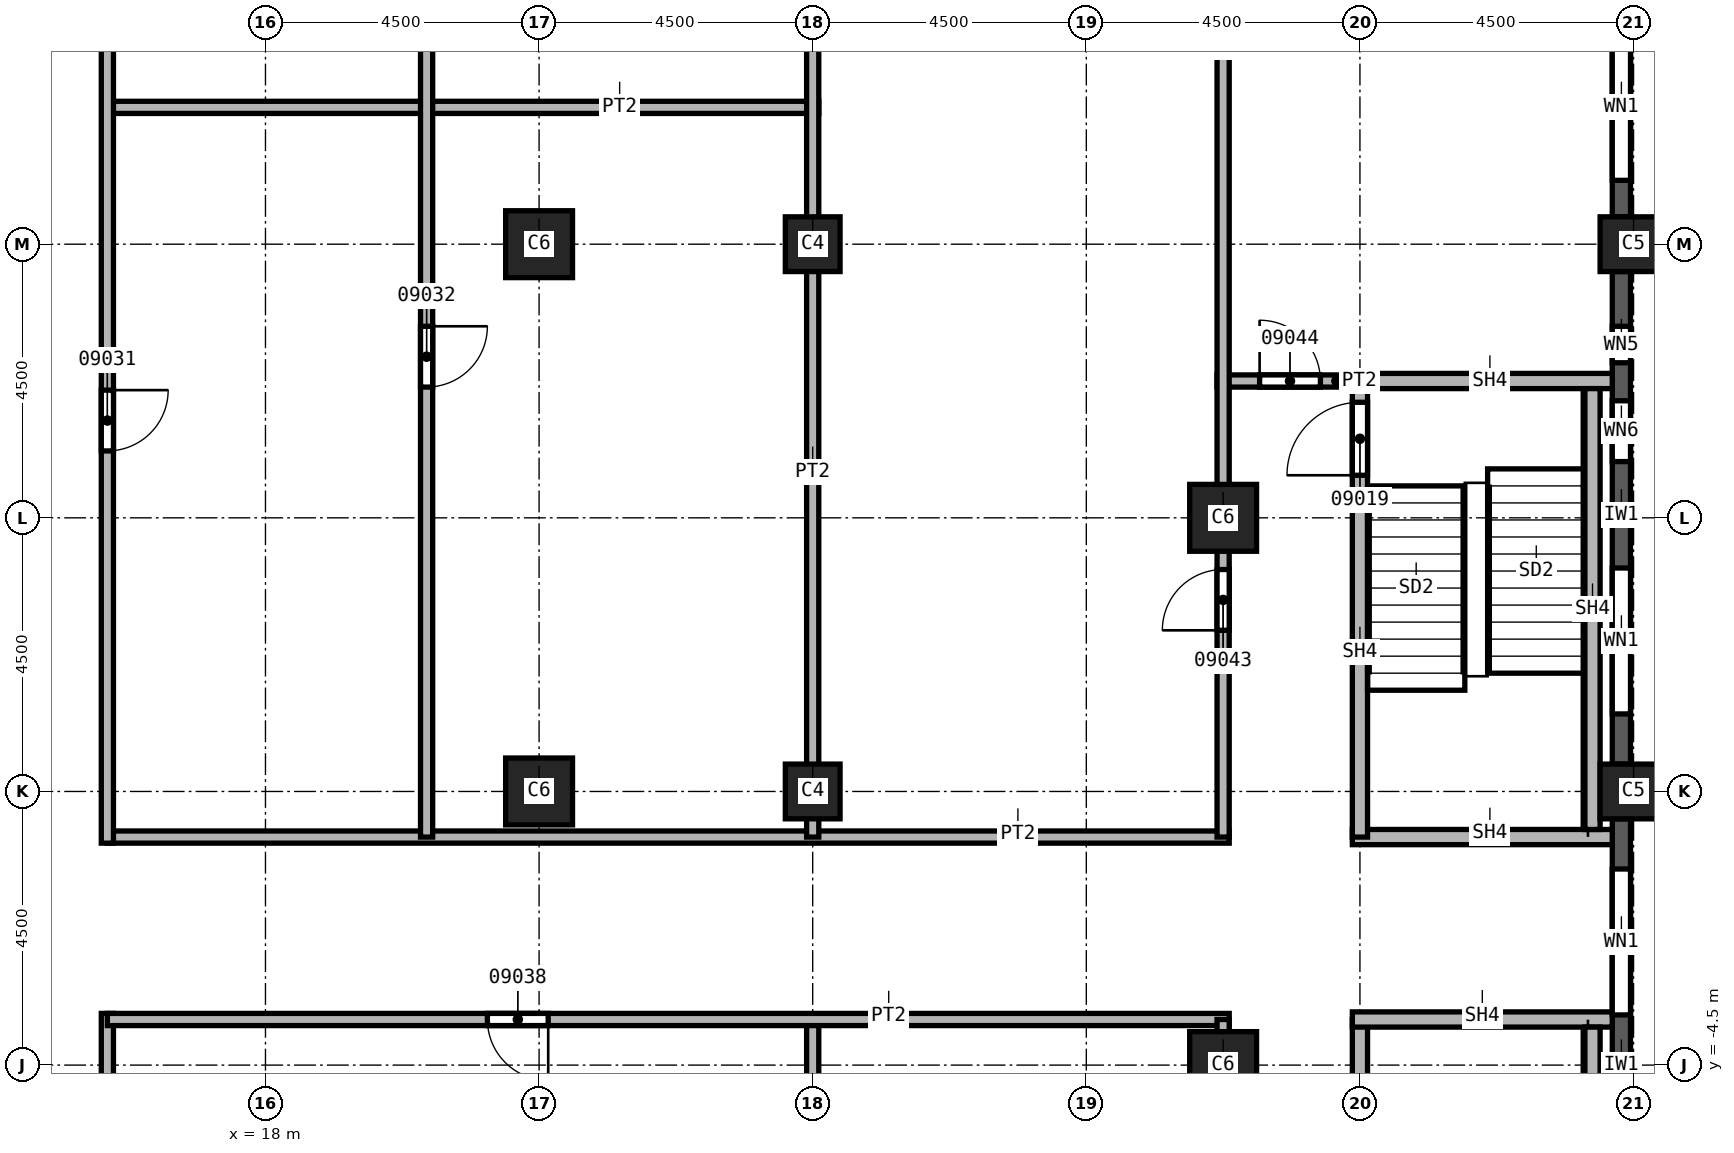
"""IFC4 building model, lengths in metres.
Left out: names, types, materials, properties, quantities, classifications, styles, units other than length and angle.
Written with IfcOpenShell. Run it as: python <this file> out.ifc"""

import sys

from ifc_helpers import new_model, si_unit, direction, frame, frame_2d, origin, origin_2d, place, context, subcontext, project, spatial, rectangle, extrude, element, fill, save


model = new_model("IFC4")
c1 = context("Model", 3, precision=1e-05, world=origin(), true_north=direction((0.0, 1.0)))
c2 = subcontext(c1, "Body", "Model", "MODEL_VIEW")
j1 = project(units=[si_unit("LENGTHUNIT", "METRE"), si_unit("PLANEANGLEUNIT", "RADIAN")], contexts=[c1])
p1 = place(None, origin())
s1 = spatial("IfcSite", under=j1, at=p1, CompositionType="ELEMENT")
p2 = place(p1, origin())
s2 = spatial("IfcBuilding", under=s1, at=p2, CompositionType="ELEMENT")
p3 = place(p2, frame((0.0, 0.0, 166.0)))
s3 = spatial("IfcBuildingStorey", under=s2, at=p3, CompositionType="ELEMENT", Elevation=166.0)
for number, where, z_axis, x_axis in (
    (1, (40.5, 0.0, 0.0), (0.0, 0.0, 1.0), (0.0, 1.0, 0.0)),
    (2, (40.5, 9.0, 0.0), (0.0, 0.0, 1.0), (0.0, 1.0, 0.0)),
):
    element("IfcColumn", number, at=place(p3, frame(where, z_axis=z_axis, x_axis=x_axis)), inside=s3, PredefinedType="COLUMN", context=c2, shape_type="SweptSolid", body=[
        extrude(rectangle(XDim=0.9, YDim=1.1, at=origin_2d()), origin(), (0.0, 0.0, 1.0), 3.7),
    ])
for number, where, z_axis, x_axis in (
    (3, (33.75, 4.5, 0.0), (0.0, 0.0, 1.0), (1.0, 0.0, 0.0)),
    (4, (33.75, -4.5, 0.0), (0.0, 0.0, 1.0), (1.0, 0.0, 0.0)),
    (5, (22.5, 0.0, 0.0), (0.0, 0.0, 1.0), (1.0, 0.0, 0.0)),
    (6, (22.5, 9.0, 0.0), (0.0, 0.0, 1.0), (1.0, 0.0, 0.0)),
):
    element("IfcColumn", number, at=place(p3, frame(where, z_axis=z_axis, x_axis=x_axis)), inside=s3, PredefinedType="COLUMN", context=c2, shape_type="SweptSolid", body=[
        extrude(rectangle(XDim=1.1, YDim=1.1, at=origin_2d()), origin(), (0.0, 0.0, 1.0), 3.7),
    ])
for number, where, z_axis, x_axis in (
    (7, (27.0, 0.0, 0.0), (0.0, 0.0, 1.0), (1.0, 0.0, 0.0)),
    (8, (27.0, 9.0, 0.0), (0.0, 0.0, 1.0), (1.0, 0.0, 0.0)),
):
    element("IfcColumn", number, at=place(p3, frame(where, z_axis=z_axis, x_axis=x_axis)), inside=s3, PredefinedType="COLUMN", context=c2, shape_type="SweptSolid", body=[
        extrude(rectangle(XDim=0.9, YDim=0.9, at=origin_2d()), origin(), (0.0, 0.0, 1.0), 3.7),
    ])
p4 = place(p3, frame((40.3, -8.55, 0.0), z_axis=(0.0, 0.0, 1.0), x_axis=(0.0, 1.0, 0.0)))
e9 = element("IfcWall", 9, at=p4, inside=s3, PredefinedType="SOLIDWALL", context=c2, shape_type="SweptSolid", body=[
    extrude(rectangle(XDim=8.1, YDim=0.3, at=frame_2d((4.05, 0.0))), origin(), (0.0, 0.0, 1.0), 3.1),
])
p5 = place(p4, frame((0.825, 0.0, 0.8)))
e10 = element("IfcOpeningElement", 10, at=p5, cuts=e9, PredefinedType="OPENING", context=c2, shape_type="SweptSolid", body=[
    extrude(rectangle(XDim=2.4, YDim=1.95, at=frame_2d((1.2, 0.975))), frame((0.0, 0.15, 0.0), z_axis=(0.0, -1.0, 0.0), x_axis=(1.0, 0.0, 0.0)), (0.0, 0.0, 1.0), 0.3),
])
p6 = place(p4, frame((4.875, 0.0, 0.8)))
e11 = element("IfcOpeningElement", 11, at=p6, cuts=e9, PredefinedType="OPENING", context=c2, shape_type="SweptSolid", body=[
    extrude(rectangle(XDim=2.4, YDim=1.95, at=frame_2d((1.2, 0.975))), frame((0.0, 0.15, 0.0), z_axis=(0.0, -1.0, 0.0), x_axis=(1.0, 0.0, 0.0)), (0.0, 0.0, 1.0), 0.3),
])
p7 = place(p3, frame((40.3, 0.45, 0.0), z_axis=(0.0, 0.0, 1.0), x_axis=(0.0, 1.0, 0.0)))
e12 = element("IfcWall", 12, at=p7, inside=s3, PredefinedType="SOLIDWALL", context=c2, shape_type="SweptSolid", body=[
    extrude(rectangle(XDim=8.1, YDim=0.3, at=frame_2d((4.05, 0.0))), origin(), (0.0, 0.0, 1.0), 3.1),
])
p8 = place(p7, frame((0.825, 0.0, 0.8)))
e13 = element("IfcOpeningElement", 13, at=p8, cuts=e12, PredefinedType="OPENING", context=c2, shape_type="SweptSolid", body=[
    extrude(rectangle(XDim=2.4, YDim=1.95, at=frame_2d((1.2, 0.975))), frame((0.0, 0.15, 0.0), z_axis=(0.0, -1.0, 0.0), x_axis=(1.0, 0.0, 0.0)), (0.0, 0.0, 1.0), 0.3),
])
p9 = place(p7, frame((4.975, 0.0, 0.8)))
e14 = element("IfcOpeningElement", 14, at=p9, cuts=e12, PredefinedType="OPENING", context=c2, shape_type="SweptSolid", body=[
    extrude(rectangle(XDim=1.0, YDim=1.95, at=frame_2d((0.5, 0.975))), frame((0.0, 0.15, 0.0), z_axis=(0.0, -1.0, 0.0), x_axis=(1.0, 0.0, 0.0)), (0.0, 0.0, 1.0), 0.3),
])
p10 = place(p7, frame((6.6, 0.0, 0.8)))
e15 = element("IfcOpeningElement", 15, at=p10, cuts=e12, PredefinedType="OPENING", context=c2, shape_type="SweptSolid", body=[
    extrude(rectangle(XDim=0.6, YDim=1.95, at=frame_2d((0.3, 0.975))), frame((0.0, 0.15, 0.0), z_axis=(0.0, -1.0, 0.0), x_axis=(1.0, 0.0, 0.0)), (0.0, 0.0, 1.0), 0.3),
])
p11 = place(p3, frame((40.3, 9.45, 0.0), z_axis=(0.0, 0.0, 1.0), x_axis=(0.0, 1.0, 0.0)))
e16 = element("IfcWall", 16, at=p11, inside=s3, PredefinedType="SOLIDWALL", context=c2, shape_type="SweptSolid", body=[
    extrude(rectangle(XDim=3.6, YDim=0.3, at=frame_2d((1.8, 0.0))), origin(), (0.0, 0.0, 1.0), 3.1),
])
p12 = place(p11, frame((0.6, 0.0, 0.8)))
e17 = element("IfcOpeningElement", 17, at=p12, cuts=e16, PredefinedType="OPENING", context=c2, shape_type="SweptSolid", body=[
    extrude(rectangle(XDim=2.4, YDim=1.95, at=frame_2d((1.2, 0.975))), frame((0.0, 0.15, 0.0), z_axis=(0.0, -1.0, 0.0), x_axis=(1.0, 0.0, 0.0)), (0.0, 0.0, 1.0), 0.3),
])
p13 = place(p3, frame((15.4, -3.65, 0.0), z_axis=(0.0, 0.0, 1.0), x_axis=(0.0, -1.0, 0.0)))
e18 = element("IfcWall", 18, at=p13, inside=s3, PredefinedType="PARTITIONING", context=c2, shape_type="SweptSolid", body=[
    extrude(rectangle(XDim=19.6, YDim=0.2, at=frame_2d((9.8, 0.0))), origin(), (0.0, 0.0, 1.0), 3.7),
])
p14 = place(p13, frame((18.275, 0.0, 0.0)))
e19 = element("IfcOpeningElement", 19, at=p14, cuts=e18, PredefinedType="OPENING", context=c2, shape_type="SweptSolid", body=[
    extrude(rectangle(XDim=1.0, YDim=2.1, at=frame_2d((0.5, 1.05))), frame((0.0, 0.1, 0.0), z_axis=(0.0, -1.0, 0.0), x_axis=(1.0, 0.0, 0.0)), (0.0, 0.0, 1.0), 0.2),
])
p15 = place(p13, frame((14.5, 0.0, 0.0)))
e20 = element("IfcOpeningElement", 20, at=p15, cuts=e18, PredefinedType="OPENING", context=c2, shape_type="SweptSolid", body=[
    extrude(rectangle(XDim=1.0, YDim=2.1, at=frame_2d((0.5, 1.05))), frame((0.0, 0.1, 0.0), z_axis=(0.0, -1.0, 0.0), x_axis=(1.0, 0.0, 0.0)), (0.0, 0.0, 1.0), 0.2),
])
p16 = place(p13, frame((8.2, 0.0, 0.0)))
e21 = element("IfcOpeningElement", 21, at=p16, cuts=e18, PredefinedType="OPENING", context=c2, shape_type="SweptSolid", body=[
    extrude(rectangle(XDim=1.0, YDim=2.1, at=frame_2d((0.5, 1.05))), frame((0.0, 0.1, 0.0), z_axis=(0.0, -1.0, 0.0), x_axis=(1.0, 0.0, 0.0)), (0.0, 0.0, 1.0), 0.2),
])
p17 = place(p3, frame((15.4, -0.75, 0.0), z_axis=(0.0, 0.0, 1.0), x_axis=(1.0, 0.0, 0.0)))
e22 = element("IfcWall", 22, at=p17, inside=s3, PredefinedType="PARTITIONING", context=c2, shape_type="SweptSolid", body=[
    extrude(rectangle(XDim=18.45, YDim=0.2, at=frame_2d((9.225, 0.0))), origin(), (0.0, 0.0, 1.0), 3.7),
])
p18 = place(p3, frame((15.4, 11.25, 0.0), z_axis=(0.0, 0.0, 1.0), x_axis=(1.0, 0.0, 0.0)))
e23 = element("IfcWall", 23, at=p18, inside=s3, PredefinedType="PARTITIONING", context=c2, shape_type="SweptSolid", body=[
    extrude(rectangle(XDim=11.7, YDim=0.2, at=frame_2d((5.85, 0.0))), origin(), (0.0, 0.0, 1.0), 3.7),
])
p19 = place(p3, frame((15.4, 23.25, 0.0), z_axis=(0.0, 0.0, 1.0), x_axis=(0.0, -1.0, 0.0)))
e24 = element("IfcWall", 24, at=p19, inside=s3, PredefinedType="PARTITIONING", context=c2, shape_type="SweptSolid", body=[
    extrude(rectangle(XDim=24.1, YDim=0.2, at=frame_2d((12.05, 0.0))), origin(), (0.0, 0.0, 1.0), 3.7),
])
p20 = place(p19, frame((16.65, 0.0, 0.0)))
e25 = element("IfcOpeningElement", 25, at=p20, cuts=e24, PredefinedType="OPENING", context=c2, shape_type="SweptSolid", body=[
    extrude(rectangle(XDim=1.0, YDim=2.1, at=frame_2d((0.5, 1.05))), frame((0.0, 0.1, 0.0), z_axis=(0.0, -1.0, 0.0), x_axis=(1.0, 0.0, 0.0)), (0.0, 0.0, 1.0), 0.2),
])
p21 = place(p19, frame((2.8, 0.0, 0.0)))
e26 = element("IfcOpeningElement", 26, at=p21, cuts=e24, PredefinedType="OPENING", context=c2, shape_type="SweptSolid", body=[
    extrude(rectangle(XDim=1.0, YDim=2.1, at=frame_2d((0.5, 1.05))), frame((0.0, 0.1, 0.0), z_axis=(0.0, -1.0, 0.0), x_axis=(1.0, 0.0, 0.0)), (0.0, 0.0, 1.0), 0.2),
])
p22 = place(p3, frame((20.65, 23.25, 0.0), z_axis=(0.0, 0.0, 1.0), x_axis=(0.0, -1.0, 0.0)))
e27 = element("IfcWall", 27, at=p22, inside=s3, PredefinedType="PARTITIONING", context=c2, shape_type="SweptSolid", body=[
    extrude(rectangle(XDim=24.0, YDim=0.2, at=frame_2d((12.0, 0.0))), origin(), (0.0, 0.0, 1.0), 3.7),
])
p23 = place(p22, frame((15.6, 0.0, 0.0)))
e28 = element("IfcOpeningElement", 28, at=p23, cuts=e27, PredefinedType="OPENING", context=c2, shape_type="SweptSolid", body=[
    extrude(rectangle(XDim=1.0, YDim=2.1, at=frame_2d((0.5, 1.05))), frame((0.0, 0.1, 0.0), z_axis=(0.0, -1.0, 0.0), x_axis=(1.0, 0.0, 0.0)), (0.0, 0.0, 1.0), 0.2),
])
p24 = place(p22, frame((8.2, 0.0, 0.0)))
e29 = element("IfcOpeningElement", 29, at=p24, cuts=e27, PredefinedType="OPENING", context=c2, shape_type="SweptSolid", body=[
    extrude(rectangle(XDim=1.0, YDim=2.1, at=frame_2d((0.5, 1.05))), frame((0.0, 0.1, 0.0), z_axis=(0.0, -1.0, 0.0), x_axis=(1.0, 0.0, 0.0)), (0.0, 0.0, 1.0), 0.2),
])
p25 = place(p3, frame((27.0, -3.75, 0.0), z_axis=(0.0, 0.0, 1.0), x_axis=(0.0, -1.0, 0.0)))
e30 = element("IfcWall", 30, at=p25, inside=s3, PredefinedType="PARTITIONING", context=c2, shape_type="SweptSolid", body=[
    extrude(rectangle(XDim=13.7, YDim=0.2, at=frame_2d((6.85, 0.0))), origin(), (0.0, 0.0, 1.0), 3.7),
])
p26 = place(p3, frame((27.0, 17.45, 0.0), z_axis=(0.0, 0.0, 1.0), x_axis=(0.0, -1.0, 0.0)))
e31 = element("IfcWall", 31, at=p26, inside=s3, PredefinedType="PARTITIONING", context=c2, shape_type="SweptSolid", body=[
    extrude(rectangle(XDim=18.2, YDim=0.2, at=frame_2d((9.1, 0.0))), origin(), (0.0, 0.0, 1.0), 3.7),
])
p27 = place(p3, frame((33.85, -3.75, 0.0), z_axis=(0.0, 0.0, 1.0), x_axis=(-1.0, 0.0, 0.0)))
e32 = element("IfcWall", 32, at=p27, inside=s3, PredefinedType="PARTITIONING", context=c2, shape_type="SweptSolid", body=[
    extrude(rectangle(XDim=18.45, YDim=0.2, at=frame_2d((9.225, 0.0))), origin(), (0.0, 0.0, 1.0), 3.7),
])
p28 = place(p27, frame((11.2, 0.0, 0.0)))
e33 = element("IfcOpeningElement", 33, at=p28, cuts=e32, PredefinedType="OPENING", context=c2, shape_type="SweptSolid", body=[
    extrude(rectangle(XDim=1.0, YDim=2.1, at=frame_2d((0.5, 1.05))), frame((0.0, 0.1, 0.0), z_axis=(0.0, -1.0, 0.0), x_axis=(1.0, 0.0, 0.0)), (0.0, 0.0, 1.0), 0.2),
])
p29 = place(p3, frame((33.65, 6.75, 0.0), z_axis=(0.0, 0.0, 1.0), x_axis=(1.0, 0.0, 0.0)))
e34 = element("IfcWall", 34, at=p29, inside=s3, PredefinedType="PARTITIONING", context=c2, shape_type="SweptSolid", body=[
    extrude(rectangle(XDim=2.35, YDim=0.2, at=frame_2d((1.175, 0.0))), origin(), (0.0, 0.0, 1.0), 3.7),
])
p30 = place(p29, frame((0.7, 0.0, 0.0)))
e35 = element("IfcOpeningElement", 35, at=p30, cuts=e34, PredefinedType="OPENING", context=c2, shape_type="SweptSolid", body=[
    extrude(rectangle(XDim=1.0, YDim=2.1, at=frame_2d((0.5, 1.05))), frame((0.0, 0.1, 0.0), z_axis=(0.0, -1.0, 0.0), x_axis=(1.0, 0.0, 0.0)), (0.0, 0.0, 1.0), 0.2),
])
p31 = place(p3, frame((33.75, -11.25, 0.0), z_axis=(0.0, 0.0, 1.0), x_axis=(0.0, 1.0, 0.0)))
e36 = element("IfcWall", 36, at=p31, inside=s3, PredefinedType="PARTITIONING", context=c2, shape_type="SweptSolid", body=[
    extrude(rectangle(XDim=7.5, YDim=0.2, at=frame_2d((3.75, 0.0))), origin(), (0.0, 0.0, 1.0), 3.7),
])
p32 = place(p31, frame((2.35, 0.0, 0.0)))
e37 = element("IfcOpeningElement", 37, at=p32, cuts=e36, PredefinedType="OPENING", context=c2, shape_type="SweptSolid", body=[
    extrude(rectangle(XDim=1.0, YDim=2.1, at=frame_2d((0.5, 1.05))), frame((0.0, 0.1, 0.0), z_axis=(0.0, -1.0, 0.0), x_axis=(1.0, 0.0, 0.0)), (0.0, 0.0, 1.0), 0.2),
])
p33 = place(p3, frame((33.75, -0.75, 0.0), z_axis=(0.0, 0.0, 1.0), x_axis=(0.0, 1.0, 0.0)))
e38 = element("IfcWall", 38, at=p33, inside=s3, PredefinedType="PARTITIONING", context=c2, shape_type="SweptSolid", body=[
    extrude(rectangle(XDim=18.4, YDim=0.2, at=frame_2d((9.2, 0.0))), origin(), (0.0, 0.0, 1.0), 3.7),
])
p34 = place(p33, frame((3.4, 0.0, 0.0)))
e39 = element("IfcOpeningElement", 39, at=p34, cuts=e38, PredefinedType="OPENING", context=c2, shape_type="SweptSolid", body=[
    extrude(rectangle(XDim=1.0, YDim=2.1, at=frame_2d((0.5, 1.05))), frame((0.0, 0.1, 0.0), z_axis=(0.0, -1.0, 0.0), x_axis=(1.0, 0.0, 0.0)), (0.0, 0.0, 1.0), 0.2),
])
p35 = place(p3, frame((35.875, -0.75, 0.0), z_axis=(0.0, 0.0, 1.0), x_axis=(1.0, 0.0, 0.0)))
e40 = element("IfcWall", 40, at=p35, inside=s3, PredefinedType="SOLIDWALL", context=c2, shape_type="SweptSolid", body=[
    extrude(rectangle(XDim=4.275, YDim=0.25, at=frame_2d((2.137, 0.0))), origin(), (0.0, 0.0, 1.0), 3.7),
])
p36 = place(p3, frame((36.0, -11.375, 0.0), z_axis=(0.0, 0.0, 1.0), x_axis=(0.0, 1.0, 0.0)))
e41 = element("IfcWall", 41, at=p36, inside=s3, PredefinedType="SOLIDWALL", context=c2, shape_type="SweptSolid", body=[
    extrude(rectangle(XDim=7.625, YDim=0.25, at=frame_2d((3.812, 0.0))), origin(), (0.0, 0.0, 1.0), 3.7),
])
p37 = place(p36, frame((0.4, 0.0, 0.0)))
e42 = element("IfcOpeningElement", 42, at=p37, cuts=e41, PredefinedType="OPENING", context=c2, shape_type="SweptSolid", body=[
    extrude(rectangle(XDim=1.2, YDim=2.1, at=frame_2d((0.6, 1.05))), frame((0.0, 0.125, 0.0), z_axis=(0.0, -1.0, 0.0), x_axis=(1.0, 0.0, 0.0)), (0.0, 0.0, 1.0), 0.25),
])
p38 = place(p3, frame((36.0, -0.75, 0.0), z_axis=(0.0, 0.0, 1.0), x_axis=(0.0, 1.0, 0.0)))
e43 = element("IfcWall", 43, at=p38, inside=s3, PredefinedType="SOLIDWALL", context=c2, shape_type="SweptSolid", body=[
    extrude(rectangle(XDim=7.625, YDim=0.25, at=frame_2d((3.812, 0.0))), origin(), (0.0, 0.0, 1.0), 3.7),
])
p39 = place(p38, frame((5.95, 0.0, 0.0)))
e44 = element("IfcOpeningElement", 44, at=p39, cuts=e43, PredefinedType="OPENING", context=c2, shape_type="SweptSolid", body=[
    extrude(rectangle(XDim=1.2, YDim=2.1, at=frame_2d((0.6, 1.05))), frame((0.0, 0.125, 0.0), z_axis=(0.0, -1.0, 0.0), x_axis=(1.0, 0.0, 0.0)), (0.0, 0.0, 1.0), 0.25),
])
p40 = place(p3, frame((36.0, 6.75, 0.0), z_axis=(0.0, 0.0, 1.0), x_axis=(1.0, 0.0, 0.0)))
e45 = element("IfcWall", 45, at=p40, inside=s3, PredefinedType="SOLIDWALL", context=c2, shape_type="SweptSolid", body=[
    extrude(rectangle(XDim=4.15, YDim=0.25, at=frame_2d((2.075, 0.0))), origin(), (0.0, 0.0, 1.0), 3.7),
])
p41 = place(p3, frame((40.15, -3.75, 0.0), z_axis=(0.0, 0.0, 1.0), x_axis=(-1.0, 0.0, 0.0)))
e46 = element("IfcWall", 46, at=p41, inside=s3, PredefinedType="SOLIDWALL", context=c2, shape_type="SweptSolid", body=[
    extrude(rectangle(XDim=4.275, YDim=0.25, at=frame_2d((2.137, 0.0))), origin(), (0.0, 0.0, 1.0), 3.7),
])
for number, where, z_axis, x_axis in (
    (47, (39.825, -11.125, 0.0), (0.0, 0.0, 1.0), (0.0, 1.0, 0.0)),
    (48, (39.825, -0.625, 0.0), (0.0, 0.0, 1.0), (0.0, 1.0, 0.0)),
):
    element("IfcWall", number, at=place(p3, frame(where, z_axis=z_axis, x_axis=x_axis)), inside=s3, PredefinedType="SOLIDWALL", context=c2, shape_type="SweptSolid", body=[
        extrude(rectangle(XDim=7.25, YDim=0.25, at=frame_2d((3.625, 0.0))), origin(), (0.0, 0.0, 1.0), 3.7),
    ])
p42 = place(p6, origin())
e49 = element("IfcWindow", 49, at=p42, inside=s3, PartitioningType="SINGLE_PANEL", PredefinedType="WINDOW", context=c2, shape_type="SweptSolid", body=[
    extrude(rectangle(XDim=2.4, YDim=1.95, at=frame_2d((1.2, 0.975))), frame((0.0, 0.03, 0.0), z_axis=(0.0, -1.0, 0.0), x_axis=(1.0, 0.0, 0.0)), (0.0, 0.0, 1.0), 0.06),
])
fill(e11, e49)
p43 = place(p8, origin())
e50 = element("IfcWindow", 50, at=p43, inside=s3, PartitioningType="SINGLE_PANEL", PredefinedType="WINDOW", context=c2, shape_type="SweptSolid", body=[
    extrude(rectangle(XDim=2.4, YDim=1.95, at=frame_2d((1.2, 0.975))), frame((0.0, 0.03, 0.0), z_axis=(0.0, -1.0, 0.0), x_axis=(1.0, 0.0, 0.0)), (0.0, 0.0, 1.0), 0.06),
])
fill(e13, e50)
p44 = place(p12, origin())
e51 = element("IfcWindow", 51, at=p44, inside=s3, PartitioningType="SINGLE_PANEL", PredefinedType="WINDOW", context=c2, shape_type="SweptSolid", body=[
    extrude(rectangle(XDim=2.4, YDim=1.95, at=frame_2d((1.2, 0.975))), frame((0.0, 0.03, 0.0), z_axis=(0.0, -1.0, 0.0), x_axis=(1.0, 0.0, 0.0)), (0.0, 0.0, 1.0), 0.06),
])
fill(e17, e51)
p45 = place(p39, origin())
e52 = element("IfcDoor", 52, at=p45, inside=s3, OperationType="SINGLE_SWING_RIGHT", PredefinedType="DOOR", context=c2, shape_type="SweptSolid", body=[
    extrude(rectangle(XDim=1.2, YDim=2.1, at=frame_2d((0.6, 1.05))), frame((0.0, 0.025, 0.0), z_axis=(0.0, -1.0, 0.0), x_axis=(1.0, 0.0, 0.0)), (0.0, 0.0, 1.0), 0.05),
])
fill(e44, e52)
p46 = place(p20, origin())
e53 = element("IfcDoor", 53, at=p46, inside=s3, OperationType="SINGLE_SWING_RIGHT", PredefinedType="DOOR", context=c2, shape_type="SweptSolid", body=[
    extrude(rectangle(XDim=1.0, YDim=2.1, at=frame_2d((0.5, 1.05))), frame((0.0, 0.025, 0.0), z_axis=(0.0, -1.0, 0.0), x_axis=(1.0, 0.0, 0.0)), (0.0, 0.0, 1.0), 0.05),
])
fill(e25, e53)
p47 = place(p23, origin())
e54 = element("IfcDoor", 54, at=p47, inside=s3, OperationType="SINGLE_SWING_LEFT", PredefinedType="DOOR", context=c2, shape_type="SweptSolid", body=[
    extrude(rectangle(XDim=1.0, YDim=2.1, at=frame_2d((0.5, 1.05))), frame((0.0, 0.025, 0.0), z_axis=(0.0, -1.0, 0.0), x_axis=(1.0, 0.0, 0.0)), (0.0, 0.0, 1.0), 0.05),
])
fill(e28, e54)
p48 = place(p28, origin())
e55 = element("IfcDoor", 55, at=p48, inside=s3, OperationType="SINGLE_SWING_LEFT", PredefinedType="DOOR", context=c2, shape_type="SweptSolid", body=[
    extrude(rectangle(XDim=1.0, YDim=2.1, at=frame_2d((0.5, 1.05))), frame((0.0, 0.025, 0.0), z_axis=(0.0, -1.0, 0.0), x_axis=(1.0, 0.0, 0.0)), (0.0, 0.0, 1.0), 0.05),
])
fill(e33, e55)
p49 = place(p34, origin())
e56 = element("IfcDoor", 56, at=p49, inside=s3, OperationType="SINGLE_SWING_RIGHT", PredefinedType="DOOR", context=c2, shape_type="SweptSolid", body=[
    extrude(rectangle(XDim=1.0, YDim=2.1, at=frame_2d((0.5, 1.05))), frame((0.0, 0.025, 0.0), z_axis=(0.0, -1.0, 0.0), x_axis=(1.0, 0.0, 0.0)), (0.0, 0.0, 1.0), 0.05),
])
fill(e39, e56)
p50 = place(p30, origin())
e57 = element("IfcDoor", 57, at=p50, inside=s3, OperationType="SINGLE_SWING_LEFT", PredefinedType="DOOR", context=c2, shape_type="SweptSolid", body=[
    extrude(rectangle(XDim=1.0, YDim=2.1, at=frame_2d((0.5, 1.05))), frame((0.0, 0.025, 0.0), z_axis=(0.0, -1.0, 0.0), x_axis=(1.0, 0.0, 0.0)), (0.0, 0.0, 1.0), 0.05),
])
fill(e35, e57)
p51 = place(p9, origin())
e58 = element("IfcWindow", 58, at=p51, inside=s3, PartitioningType="SINGLE_PANEL", PredefinedType="WINDOW", context=c2, shape_type="SweptSolid", body=[
    extrude(rectangle(XDim=1.0, YDim=1.95, at=frame_2d((0.5, 0.975))), frame((0.0, 0.03, 0.0), z_axis=(0.0, -1.0, 0.0), x_axis=(1.0, 0.0, 0.0)), (0.0, 0.0, 1.0), 0.06),
])
fill(e14, e58)
p52 = place(p10, origin())
e59 = element("IfcWindow", 59, at=p52, inside=s3, PartitioningType="SINGLE_PANEL", PredefinedType="WINDOW", context=c2, shape_type="SweptSolid", body=[
    extrude(rectangle(XDim=0.6, YDim=1.95, at=frame_2d((0.3, 0.975))), frame((0.0, 0.03, 0.0), z_axis=(0.0, -1.0, 0.0), x_axis=(1.0, 0.0, 0.0)), (0.0, 0.0, 1.0), 0.06),
])
fill(e15, e59)
save(model, sys.argv[1])
